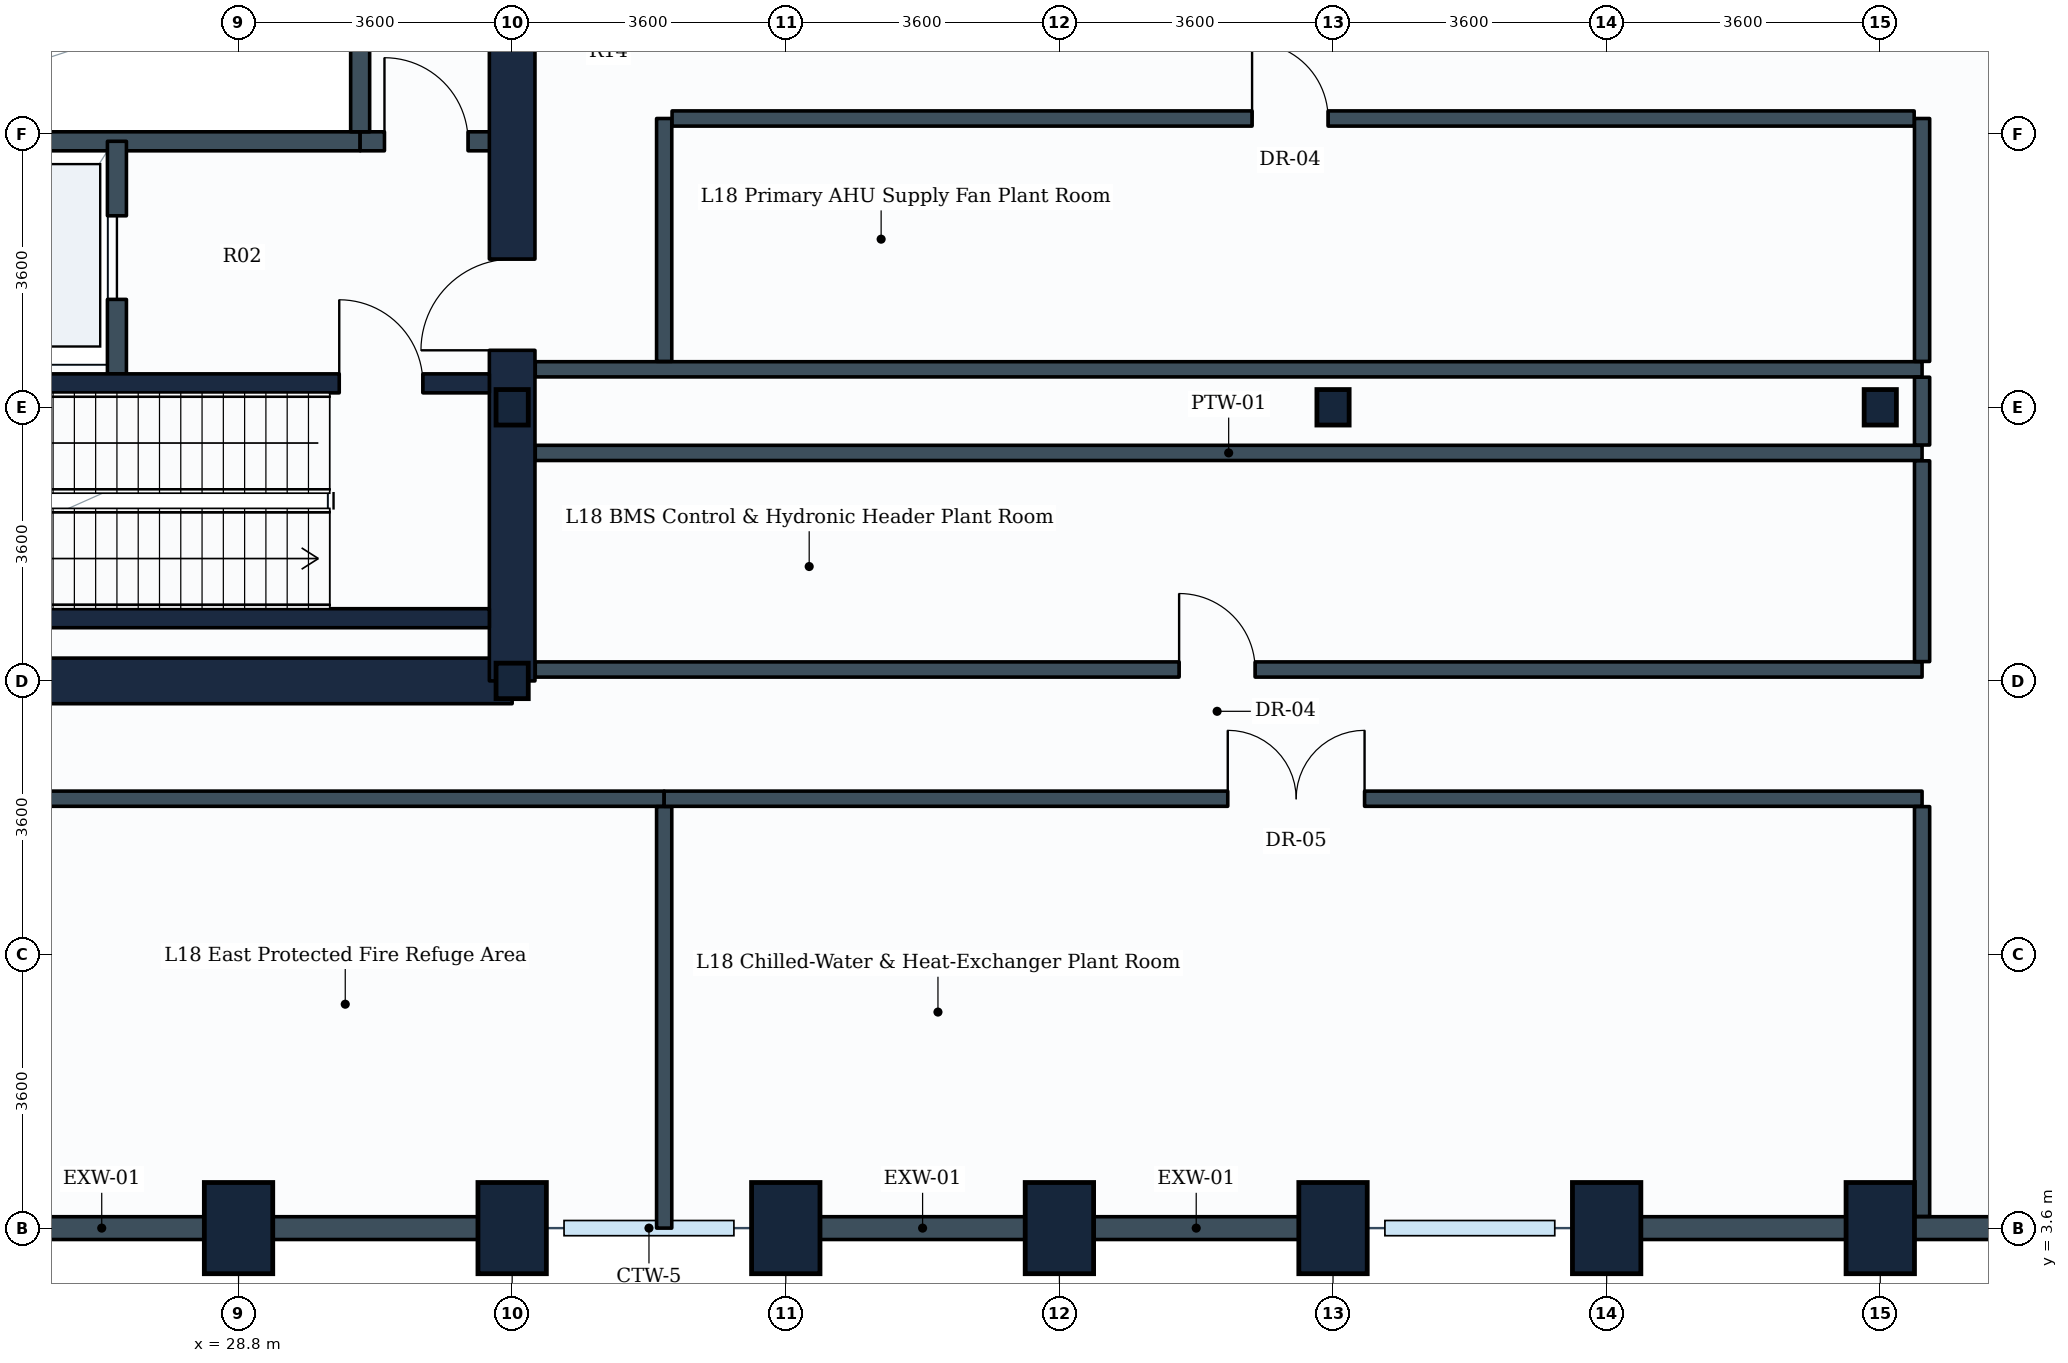
"""IFC4 building model, lengths in metres.
Left out: names, types, materials, properties, quantities, classifications, styles, units other than length and angle.
Written with IfcOpenShell. Run it as: python <this file> out.ifc"""

import sys

from ifc_helpers import new_model, si_unit, direction, frame, frame_2d, origin, origin_2d, place, context, subcontext, project, spatial, rectangle, i_section, extrude, element, fill, save


model = new_model("IFC4")
c1 = context("Model", 3, precision=1e-05, world=origin(), true_north=direction((0.0, 1.0)))
c2 = subcontext(c1, "Body", "Model", "MODEL_VIEW")
j1 = project(units=[si_unit("LENGTHUNIT", "METRE"), si_unit("PLANEANGLEUNIT", "RADIAN")], contexts=[c1])
p1 = place(None, origin())
s1 = spatial("IfcSite", under=j1, at=p1, CompositionType="ELEMENT")
p2 = place(p1, origin())
s2 = spatial("IfcBuilding", under=s1, at=p2, CompositionType="ELEMENT")
p3 = place(p2, frame((0.0, 0.0, 74.7)))
s3 = spatial("IfcBuildingStorey", under=s2, at=p3, CompositionType="ELEMENT", Elevation=74.7)
for number, where, z_axis, x_axis in (
    (1, (28.8, 3.6, 0.0), (0.0, 0.0, 1.0), (1.0, 0.0, 0.0)),
    (2, (32.4, 3.6, 0.0), (0.0, 0.0, 1.0), (1.0, 0.0, 0.0)),
):
    element("IfcColumn", number, at=place(p3, frame(where, z_axis=z_axis, x_axis=x_axis)), inside=s3, PredefinedType="COLUMN", context=c2, shape_type="SweptSolid", body=[
        extrude(rectangle(XDim=0.9, YDim=1.2, at=origin_2d()), origin(), (0.0, 0.0, 1.0), 5.4),
    ])
for number, where, z_axis, x_axis in (
    (3, (32.4, 10.8, 0.0), (0.0, 0.0, 1.0), (1.0, 0.0, 0.0)),
    (4, (32.4, 14.4, 0.0), (0.0, 0.0, 1.0), (1.0, 0.0, 0.0)),
):
    element("IfcColumn", number, at=place(p3, frame(where, z_axis=z_axis, x_axis=x_axis)), inside=s3, PredefinedType="COLUMN", context=c2, shape_type="SweptSolid", body=[
        extrude(i_section(OverallWidth=0.424, OverallDepth=0.467, WebThickness=0.033, FlangeThickness=0.053, FilletRadius=0.015, at=origin_2d()), origin(), (0.0, 0.0, 1.0), 5.4),
    ])
for number, where, z_axis, x_axis in (
    (5, (36.0, 3.6, 0.0), (0.0, 0.0, 1.0), (1.0, 0.0, 0.0)),
    (6, (39.6, 3.6, 0.0), (0.0, 0.0, 1.0), (1.0, 0.0, 0.0)),
    (7, (43.2, 3.6, 0.0), (0.0, 0.0, 1.0), (1.0, 0.0, 0.0)),
):
    element("IfcColumn", number, at=place(p3, frame(where, z_axis=z_axis, x_axis=x_axis)), inside=s3, PredefinedType="COLUMN", context=c2, shape_type="SweptSolid", body=[
        extrude(rectangle(XDim=0.9, YDim=1.2, at=origin_2d()), origin(), (0.0, 0.0, 1.0), 5.4),
    ])
p4 = place(p3, frame((43.2, 14.4, 0.0), z_axis=(0.0, 0.0, 1.0), x_axis=(1.0, 0.0, 0.0)))
e8 = element("IfcColumn", 8, at=p4, inside=s3, PredefinedType="COLUMN", context=c2, shape_type="SweptSolid", body=[
    extrude(i_section(OverallWidth=0.424, OverallDepth=0.467, WebThickness=0.033, FlangeThickness=0.053, FilletRadius=0.015, at=origin_2d()), origin(), (0.0, 0.0, 1.0), 5.4),
])
for number, where, z_axis, x_axis in (
    (9, (46.8, 3.6, 0.0), (0.0, 0.0, 1.0), (1.0, 0.0, 0.0)),
    (10, (50.4, 3.6, 0.0), (0.0, 0.0, 1.0), (1.0, 0.0, 0.0)),
):
    element("IfcColumn", number, at=place(p3, frame(where, z_axis=z_axis, x_axis=x_axis)), inside=s3, PredefinedType="COLUMN", context=c2, shape_type="SweptSolid", body=[
        extrude(rectangle(XDim=0.9, YDim=1.2, at=origin_2d()), origin(), (0.0, 0.0, 1.0), 5.4),
    ])
p5 = place(p3, frame((50.4, 14.4, 0.0), z_axis=(0.0, 0.0, 1.0), x_axis=(1.0, 0.0, 0.0)))
e11 = element("IfcColumn", 11, at=p5, inside=s3, PredefinedType="COLUMN", context=c2, shape_type="SweptSolid", body=[
    extrude(i_section(OverallWidth=0.424, OverallDepth=0.467, WebThickness=0.033, FlangeThickness=0.053, FilletRadius=0.015, at=origin_2d()), origin(), (0.0, 0.0, 1.0), 5.4),
])
p6 = place(p3, frame((28.8, 3.6, 0.0), z_axis=(0.0, 0.0, 1.0), x_axis=(-1.0, 0.0, 0.0)))
e12 = element("IfcWall", 12, at=p6, inside=s3, PredefinedType="STANDARD", context=c2, shape_type="SweptSolid", body=[
    extrude(rectangle(XDim=3.6, YDim=0.3, at=frame_2d((1.8, 0.0))), origin(), (0.0, 0.0, 1.0), 4.43),
])
p7 = place(p3, frame((32.4, 3.6, 0.0), z_axis=(0.0, 0.0, 1.0), x_axis=(-1.0, 0.0, 0.0)))
e13 = element("IfcWall", 13, at=p7, inside=s3, PredefinedType="STANDARD", context=c2, shape_type="SweptSolid", body=[
    extrude(rectangle(XDim=3.6, YDim=0.3, at=frame_2d((1.8, 0.0))), origin(), (0.0, 0.0, 1.0), 4.43),
])
p8 = place(p3, frame((39.6, 3.6, 0.0), z_axis=(0.0, 0.0, 1.0), x_axis=(-1.0, 0.0, 0.0)))
e14 = element("IfcWall", 14, at=p8, inside=s3, PredefinedType="STANDARD", context=c2, shape_type="SweptSolid", body=[
    extrude(rectangle(XDim=3.6, YDim=0.3, at=frame_2d((1.8, 0.0))), origin(), (0.0, 0.0, 1.0), 4.43),
])
for number, where, z_axis, x_axis in (
    (15, (43.2, 3.6, 0.0), (0.0, 0.0, 1.0), (-1.0, 0.0, 0.0)),
    (16, (50.4, 3.6, 0.0), (0.0, 0.0, 1.0), (-1.0, 0.0, 0.0)),
):
    element("IfcWall", number, at=place(p3, frame(where, z_axis=z_axis, x_axis=x_axis)), inside=s3, PredefinedType="STANDARD", context=c2, shape_type="SweptSolid", body=[
        extrude(rectangle(XDim=3.6, YDim=0.3, at=frame_2d((1.8, 0.0))), origin(), (0.0, 0.0, 1.0), 4.43),
    ])
p9 = place(p3, frame((54.0, 3.6, 0.0), z_axis=(0.0, 0.0, 1.0), x_axis=(-1.0, 0.0, 0.0)))
e17 = element("IfcWall", 17, at=p9, inside=s3, PredefinedType="STANDARD", context=c2, shape_type="SweptSolid", body=[
    extrude(rectangle(XDim=3.6, YDim=0.3, at=frame_2d((1.8, 0.0))), origin(), (0.0, 0.0, 1.0), 4.43),
])
p10 = place(p3, frame((14.4, 10.8, 0.0), z_axis=(0.0, 0.0, 1.0), x_axis=(1.0, 0.0, 0.0)))
e18 = element("IfcWall", 18, at=p10, inside=s3, PredefinedType="SHEAR", context=c2, shape_type="SweptSolid", body=[
    extrude(rectangle(XDim=18.0, YDim=0.6, at=frame_2d((9.0, 0.0))), origin(), (0.0, 0.0, 1.0), 5.08),
])
p11 = place(p3, frame((32.4, 10.8, 0.0), z_axis=(0.0, 0.0, 1.0), x_axis=(0.0, 1.0, 0.0)))
e19 = element("IfcWall", 19, at=p11, inside=s3, PredefinedType="SHEAR", context=c2, shape_type="SweptSolid", body=[
    extrude(rectangle(XDim=14.4, YDim=0.6, at=frame_2d((7.2, 0.0))), origin(), (0.0, 0.0, 1.0), 5.08),
])
p12 = place(p11, frame((4.35, 0.0, 0.0)))
e20 = element("IfcOpeningElement", 20, at=p12, cuts=e19, PredefinedType="OPENING", context=c2, shape_type="SweptSolid", body=[
    extrude(rectangle(XDim=1.2, YDim=2.1, at=frame_2d((0.6, 1.05))), frame((0.0, 0.31, 0.0), z_axis=(0.0, -1.0, 0.0), x_axis=(1.0, 0.0, 0.0)), (0.0, 0.0, 1.0), 0.62),
])
p13 = place(p11, frame((10.0, 0.0, 0.0)))
e21 = element("IfcOpeningElement", 21, at=p13, cuts=e19, PredefinedType="OPENING", context=c2, shape_type="SweptSolid", body=[
    extrude(rectangle(XDim=1.2, YDim=2.1, at=frame_2d((0.6, 1.05))), frame((0.0, 0.31, 0.0), z_axis=(0.0, -1.0, 0.0), x_axis=(1.0, 0.0, 0.0)), (0.0, 0.0, 1.0), 0.62),
])
p14 = place(p3, frame((23.35, 11.625, 0.0), z_axis=(0.0, 0.0, 1.0), x_axis=(1.0, 0.0, 0.0)))
e22 = element("IfcWall", 22, at=p14, inside=s3, PredefinedType="SHEAR", context=c2, shape_type="SweptSolid", body=[
    extrude(rectangle(XDim=8.75, YDim=0.25, at=frame_2d((4.375, 0.0))), origin(), (0.0, 0.0, 1.0), 5.08),
])
p15 = place(p3, frame((23.35, 14.715, 0.0), z_axis=(0.0, 0.0, 1.0), x_axis=(1.0, 0.0, 0.0)))
e23 = element("IfcWall", 23, at=p15, inside=s3, PredefinedType="SHEAR", context=c2, shape_type="SweptSolid", body=[
    extrude(rectangle(XDim=8.75, YDim=0.25, at=frame_2d((4.375, 0.0))), origin(), (0.0, 0.0, 1.0), 5.08),
])
p16 = place(p15, frame((6.775, 0.0, 0.0)))
e24 = element("IfcOpeningElement", 24, at=p16, cuts=e23, PredefinedType="OPENING", context=c2, shape_type="SweptSolid", body=[
    extrude(rectangle(XDim=1.1, YDim=2.1, at=frame_2d((0.55, 1.05))), frame((0.0, 0.135, 0.0), z_axis=(0.0, -1.0, 0.0), x_axis=(1.0, 0.0, 0.0)), (0.0, 0.0, 1.0), 0.27),
])
p17 = place(p3, frame((21.88, 17.9, 0.0), z_axis=(0.0, 0.0, 1.0), x_axis=(1.0, 0.0, 0.0)))
e25 = element("IfcWall", 25, at=p17, inside=s3, PredefinedType="PARTITIONING", context=c2, shape_type="SweptSolid", body=[
    extrude(rectangle(XDim=8.52, YDim=0.25, at=frame_2d((4.26, 0.0))), origin(), (0.0, 0.0, 1.0), 5.065),
])
p18 = place(p3, frame((30.4, 17.9, 0.0), z_axis=(0.0, 0.0, 1.0), x_axis=(1.0, 0.0, 0.0)))
e26 = element("IfcWall", 26, at=p18, inside=s3, PredefinedType="PARTITIONING", context=c2, shape_type="SweptSolid", body=[
    extrude(rectangle(XDim=1.75, YDim=0.25, at=frame_2d((0.875, 0.0))), origin(), (0.0, 0.0, 1.0), 5.065),
])
p19 = place(p18, frame((0.32, 0.0, 0.0)))
e27 = element("IfcOpeningElement", 27, at=p19, cuts=e26, PredefinedType="OPENING", context=c2, shape_type="SweptSolid", body=[
    extrude(rectangle(XDim=1.1, YDim=2.1, at=frame_2d((0.55, 1.05))), frame((0.0, 0.135, 0.0), z_axis=(0.0, -1.0, 0.0), x_axis=(1.0, 0.0, 0.0)), (0.0, 0.0, 1.0), 0.27),
])
p20 = place(p3, frame((27.2, 14.84, 0.0), z_axis=(0.0, 0.0, 1.0), x_axis=(0.0, 1.0, 0.0)))
e28 = element("IfcWall", 28, at=p20, inside=s3, PredefinedType="PARTITIONING", context=c2, shape_type="SweptSolid", body=[
    extrude(rectangle(XDim=3.06, YDim=0.25, at=frame_2d((1.53, 0.0))), origin(), (0.0, 0.0, 1.0), 5.065),
])
p21 = place(p20, frame((0.98, 0.0, 0.0)))
e29 = element("IfcOpeningElement", 29, at=p21, cuts=e28, PredefinedType="OPENING", context=c2, shape_type="SweptSolid", body=[
    extrude(rectangle(XDim=1.1, YDim=2.1, at=frame_2d((0.55, 1.05))), frame((0.0, 0.135, 0.0), z_axis=(0.0, -1.0, 0.0), x_axis=(1.0, 0.0, 0.0)), (0.0, 0.0, 1.0), 0.27),
])
p22 = place(p3, frame((30.4, 18.025, 0.0), z_axis=(0.0, 0.0, 1.0), x_axis=(0.0, 1.0, 0.0)))
e30 = element("IfcWall", 30, at=p22, inside=s3, PredefinedType="PARTITIONING", context=c2, shape_type="SweptSolid", body=[
    extrude(rectangle(XDim=2.27, YDim=0.25, at=frame_2d((1.135, 0.0))), origin(), (0.0, 0.0, 1.0), 5.065),
])
for number, where, z_axis, x_axis in (
    (31, (32.704, 13.8, 0.0), (0.0, 0.0, 1.0), (1.0, 0.0, 0.0)),
    (32, (32.704, 14.9, 0.0), (0.0, 0.0, 1.0), (1.0, 0.0, 0.0)),
):
    element("IfcWall", number, at=place(p3, frame(where, z_axis=z_axis, x_axis=x_axis)), inside=s3, PredefinedType="PARTITIONING", context=c2, shape_type="SweptSolid", body=[
        extrude(rectangle(XDim=18.246, YDim=0.2, at=frame_2d((9.123, 0.0))), origin(), (0.0, 0.0, 1.0), 3.58),
    ])
p23 = place(p3, frame((50.95, 13.904, 0.0), z_axis=(0.0, 0.0, 1.0), x_axis=(0.0, 1.0, 0.0)))
e33 = element("IfcWall", 33, at=p23, inside=s3, PredefinedType="PARTITIONING", context=c2, shape_type="SweptSolid", body=[
    extrude(rectangle(XDim=0.892, YDim=0.2, at=frame_2d((0.446, 0.0))), origin(), (0.0, 0.0, 1.0), 3.58),
])
p24 = place(p3, frame((13.03, 9.25, 0.0), z_axis=(0.0, 0.0, 1.0), x_axis=(1.0, 0.0, 0.0)))
e34 = element("IfcWall", 34, at=p24, inside=s3, PredefinedType="PARTITIONING", context=c2, shape_type="SweptSolid", body=[
    extrude(rectangle(XDim=21.37, YDim=0.2, at=frame_2d((10.685, 0.0))), origin(), (0.0, 0.0, 1.0), 4.61),
])
p25 = place(p24, frame((11.248, 0.0, 0.0)))
e35 = element("IfcOpeningElement", 35, at=p25, cuts=e34, PredefinedType="OPENING", context=c2, shape_type="SweptSolid", body=[
    extrude(rectangle(XDim=1.2, YDim=2.1, at=frame_2d((0.6, 1.05))), frame((0.0, 0.11, 0.0), z_axis=(0.0, -1.0, 0.0), x_axis=(1.0, 0.0, 0.0)), (0.0, 0.0, 1.0), 0.22),
])
p26 = place(p3, frame((34.4, 3.6, 0.0), z_axis=(0.0, 0.0, 1.0), x_axis=(0.0, 1.0, 0.0)))
e36 = element("IfcWall", 36, at=p26, inside=s3, PredefinedType="PARTITIONING", context=c2, shape_type="SweptSolid", body=[
    extrude(rectangle(XDim=5.546, YDim=0.2, at=frame_2d((2.773, 0.0))), origin(), (0.0, 0.0, 1.0), 4.43),
])
p27 = place(p3, frame((34.4, 9.25, 0.0), z_axis=(0.0, 0.0, 1.0), x_axis=(1.0, 0.0, 0.0)))
e37 = element("IfcWall", 37, at=p27, inside=s3, PredefinedType="PARTITIONING", context=c2, shape_type="SweptSolid", body=[
    extrude(rectangle(XDim=16.55, YDim=0.2, at=frame_2d((8.275, 0.0))), origin(), (0.0, 0.0, 1.0), 4.61),
])
p28 = place(p27, frame((7.415, 0.0, 0.0)))
e38 = element("IfcOpeningElement", 38, at=p28, cuts=e37, PredefinedType="OPENING", context=c2, shape_type="SweptSolid", body=[
    extrude(rectangle(XDim=1.8, YDim=2.2, at=frame_2d((0.9, 1.1))), frame((0.0, 0.11, 0.0), z_axis=(0.0, -1.0, 0.0), x_axis=(1.0, 0.0, 0.0)), (0.0, 0.0, 1.0), 0.22),
])
p29 = place(p3, frame((50.95, 3.754, 0.0), z_axis=(0.0, 0.0, 1.0), x_axis=(0.0, 1.0, 0.0)))
e39 = element("IfcWall", 39, at=p29, inside=s3, PredefinedType="PARTITIONING", context=c2, shape_type="SweptSolid", body=[
    extrude(rectangle(XDim=5.392, YDim=0.2, at=frame_2d((2.696, 0.0))), origin(), (0.0, 0.0, 1.0), 4.43),
])
for number, where, z_axis, x_axis in (
    (40, (34.4, 15.004, 0.0), (0.0, 0.0, 1.0), (0.0, 1.0, 0.0)),
    (41, (50.95, 15.004, 0.0), (0.0, 0.0, 1.0), (0.0, 1.0, 0.0)),
):
    element("IfcWall", number, at=place(p3, frame(where, z_axis=z_axis, x_axis=x_axis)), inside=s3, PredefinedType="PARTITIONING", context=c2, shape_type="SweptSolid", body=[
        extrude(rectangle(XDim=3.196, YDim=0.2, at=frame_2d((1.598, 0.0))), origin(), (0.0, 0.0, 1.0), 3.58),
    ])
p30 = place(p3, frame((34.504, 18.2, 0.0), z_axis=(0.0, 0.0, 1.0), x_axis=(1.0, 0.0, 0.0)))
e42 = element("IfcWall", 42, at=p30, inside=s3, PredefinedType="PARTITIONING", context=c2, shape_type="SweptSolid", body=[
    extrude(rectangle(XDim=16.342, YDim=0.2, at=frame_2d((8.171, 0.0))), origin(), (0.0, 0.0, 1.0), 4.61),
])
p31 = place(p30, frame((7.631, 0.0, 0.0)))
e43 = element("IfcOpeningElement", 43, at=p31, cuts=e42, PredefinedType="OPENING", context=c2, shape_type="SweptSolid", body=[
    extrude(rectangle(XDim=1.0, YDim=2.1, at=frame_2d((0.5, 1.05))), frame((0.0, 0.11, 0.0), z_axis=(0.0, -1.0, 0.0), x_axis=(1.0, 0.0, 0.0)), (0.0, 0.0, 1.0), 0.22),
])
p32 = place(p3, frame((32.704, 10.95, 0.0), z_axis=(0.0, 0.0, 1.0), x_axis=(1.0, 0.0, 0.0)))
e44 = element("IfcWall", 44, at=p32, inside=s3, PredefinedType="PARTITIONING", context=c2, shape_type="SweptSolid", body=[
    extrude(rectangle(XDim=18.246, YDim=0.2, at=frame_2d((9.123, 0.0))), origin(), (0.0, 0.0, 1.0), 4.61),
])
p33 = place(p32, frame((8.471, 0.0, 0.0)))
e45 = element("IfcOpeningElement", 45, at=p33, cuts=e44, PredefinedType="OPENING", context=c2, shape_type="SweptSolid", body=[
    extrude(rectangle(XDim=1.0, YDim=2.1, at=frame_2d((0.5, 1.05))), frame((0.0, 0.11, 0.0), z_axis=(0.0, -1.0, 0.0), x_axis=(1.0, 0.0, 0.0)), (0.0, 0.0, 1.0), 0.22),
])
p34 = place(p3, frame((50.95, 11.054, 0.0), z_axis=(0.0, 0.0, 1.0), x_axis=(0.0, 1.0, 0.0)))
e46 = element("IfcWall", 46, at=p34, inside=s3, PredefinedType="PARTITIONING", context=c2, shape_type="SweptSolid", body=[
    extrude(rectangle(XDim=2.642, YDim=0.2, at=frame_2d((1.321, 0.0))), origin(), (0.0, 0.0, 1.0), 5.065),
])
p35 = place(p16, origin())
e47 = element("IfcDoor", 47, at=p35, inside=s3, OperationType="SINGLE_SWING_LEFT", PredefinedType="DOOR", context=c2, shape_type="SweptSolid", body=[
    extrude(rectangle(XDim=1.1, YDim=2.1, at=frame_2d((0.55, 1.05))), frame((0.0, 0.025, 0.0), z_axis=(0.0, -1.0, 0.0), x_axis=(1.0, 0.0, 0.0)), (0.0, 0.0, 1.0), 0.05),
])
fill(e24, e47)
p36 = place(p21, origin())
e48 = element("IfcDoor", 48, at=p36, inside=s3, OperationType="SLIDING_TO_LEFT", PredefinedType="DOOR", context=c2, shape_type="SweptSolid", body=[
    extrude(rectangle(XDim=1.1, YDim=2.1, at=frame_2d((0.55, 1.05))), frame((0.0, 0.025, 0.0), z_axis=(0.0, -1.0, 0.0), x_axis=(1.0, 0.0, 0.0)), (0.0, 0.0, 1.0), 0.05),
])
fill(e29, e48)
p37 = place(p12, origin())
e49 = element("IfcDoor", 49, at=p37, inside=s3, OperationType="SINGLE_SWING_LEFT", PredefinedType="DOOR", context=c2, shape_type="SweptSolid", body=[
    extrude(rectangle(XDim=1.2, YDim=2.1, at=frame_2d((0.6, 1.05))), frame((0.0, 0.025, 0.0), z_axis=(0.0, -1.0, 0.0), x_axis=(1.0, 0.0, 0.0)), (0.0, 0.0, 1.0), 0.05),
])
fill(e20, e49)
p38 = place(p19, origin())
e50 = element("IfcDoor", 50, at=p38, inside=s3, OperationType="SINGLE_SWING_LEFT", PredefinedType="DOOR", context=c2, shape_type="SweptSolid", body=[
    extrude(rectangle(XDim=1.1, YDim=2.1, at=frame_2d((0.55, 1.05))), frame((0.0, 0.025, 0.0), z_axis=(0.0, -1.0, 0.0), x_axis=(1.0, 0.0, 0.0)), (0.0, 0.0, 1.0), 0.05),
])
fill(e27, e50)
p39 = place(p28, origin())
e51 = element("IfcDoor", 51, at=p39, inside=s3, OperationType="DOUBLE_DOOR_SINGLE_SWING", PredefinedType="DOOR", context=c2, shape_type="SweptSolid", body=[
    extrude(rectangle(XDim=1.8, YDim=2.2, at=frame_2d((0.9, 1.1))), frame((0.0, 0.025, 0.0), z_axis=(0.0, -1.0, 0.0), x_axis=(1.0, 0.0, 0.0)), (0.0, 0.0, 1.0), 0.05),
])
fill(e38, e51)
p40 = place(p31, origin())
e52 = element("IfcDoor", 52, at=p40, inside=s3, OperationType="SINGLE_SWING_LEFT", PredefinedType="DOOR", context=c2, shape_type="SweptSolid", body=[
    extrude(rectangle(XDim=1.0, YDim=2.1, at=frame_2d((0.5, 1.05))), frame((0.0, 0.025, 0.0), z_axis=(0.0, -1.0, 0.0), x_axis=(1.0, 0.0, 0.0)), (0.0, 0.0, 1.0), 0.05),
])
fill(e43, e52)
p41 = place(p33, origin())
e53 = element("IfcDoor", 53, at=p41, inside=s3, OperationType="SINGLE_SWING_LEFT", PredefinedType="DOOR", context=c2, shape_type="SweptSolid", body=[
    extrude(rectangle(XDim=1.0, YDim=2.1, at=frame_2d((0.5, 1.05))), frame((0.0, 0.025, 0.0), z_axis=(0.0, -1.0, 0.0), x_axis=(1.0, 0.0, 0.0)), (0.0, 0.0, 1.0), 0.05),
])
fill(e45, e53)
save(model, sys.argv[1])
